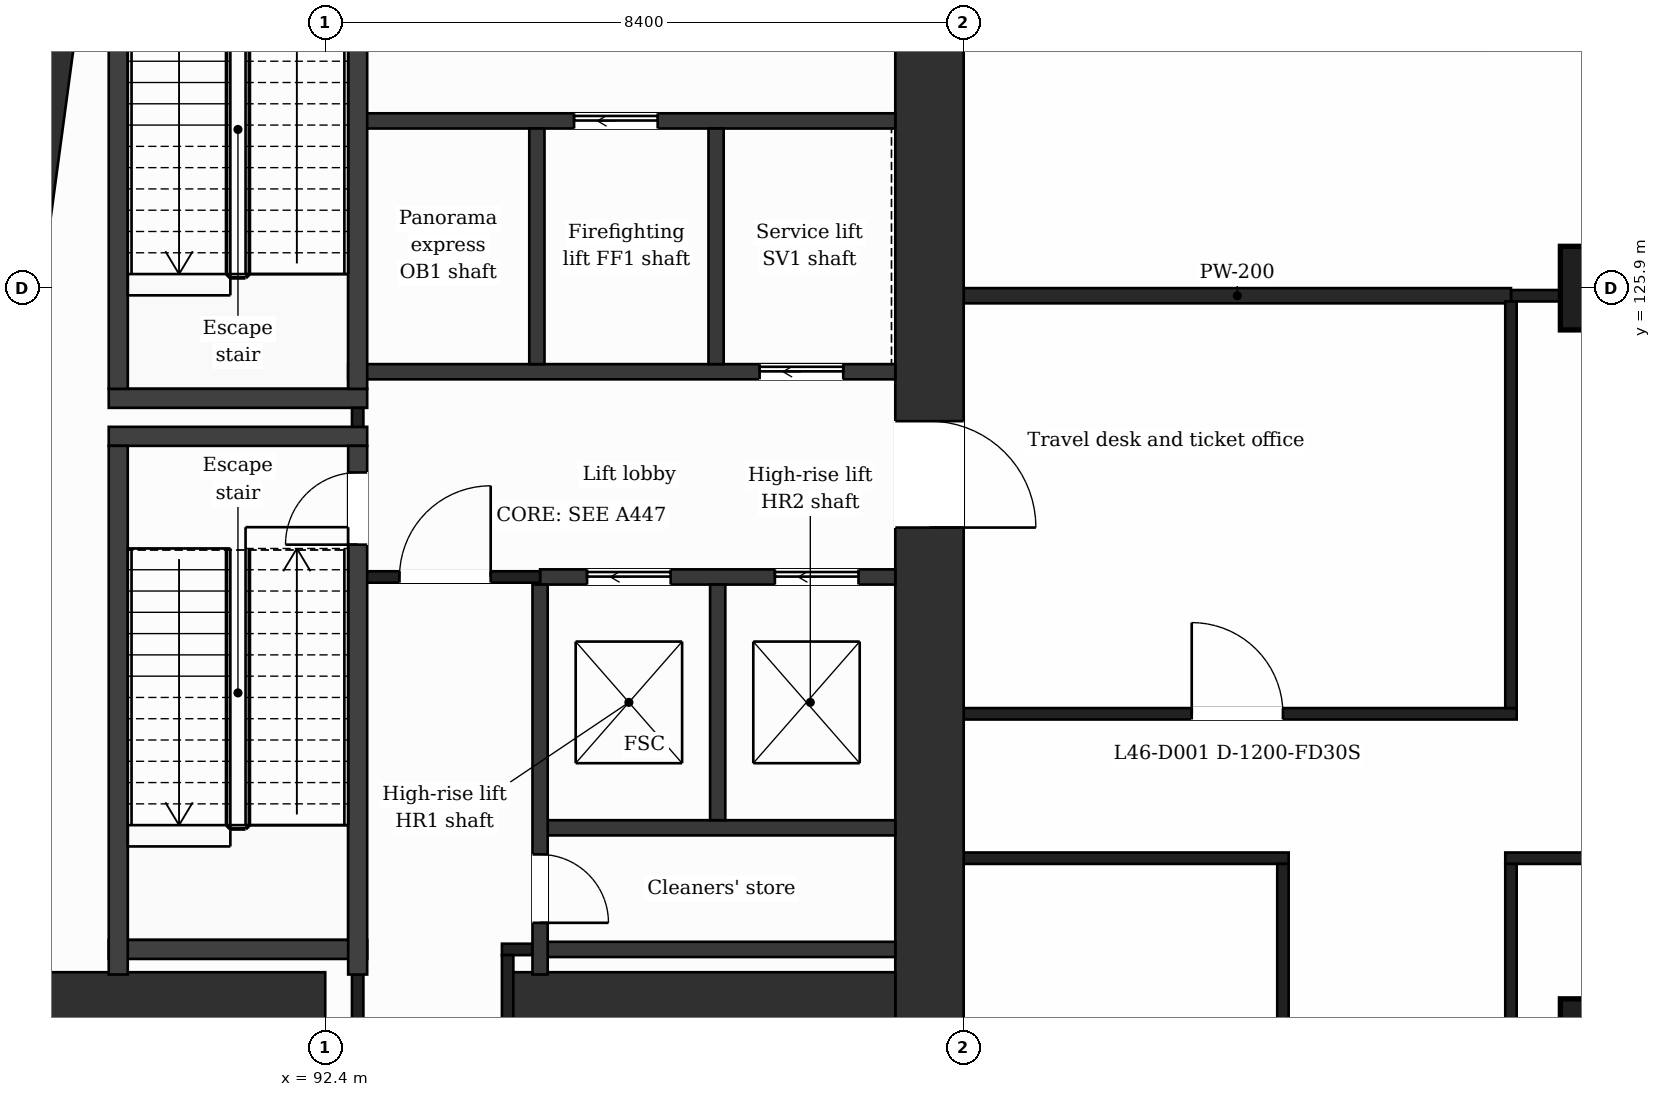
"""IFC4 building model, lengths in metres.
Left out: names, types, materials, properties, quantities, classifications, styles, units other than length and angle.
Written with IfcOpenShell. Run it as: python <this file> out.ifc"""

import sys

from ifc_helpers import new_model, si_unit, direction, frame, frame_2d, origin, origin_2d, place, context, subcontext, project, spatial, rectangle, extrude, element, fill, save


model = new_model("IFC4")
c1 = context("Model", 3, precision=1e-05, world=origin(), true_north=direction((0.0, 1.0)))
c2 = subcontext(c1, "Body", "Model", "MODEL_VIEW")
j1 = project(units=[si_unit("LENGTHUNIT", "METRE"), si_unit("PLANEANGLEUNIT", "RADIAN")], contexts=[c1])
p1 = place(None, origin())
s1 = spatial("IfcSite", under=j1, at=p1, CompositionType="ELEMENT")
p2 = place(p1, origin())
s2 = spatial("IfcBuilding", under=s1, at=p2, CompositionType="ELEMENT")
p3 = place(p2, frame((0.0, 0.0, 192.2)))
s3 = spatial("IfcBuildingStorey", under=s2, at=p3, CompositionType="ELEMENT", Elevation=192.2)
p4 = place(p3, frame((100.35, 131.95, 0.0), z_axis=(0.0, 0.0, 1.0), x_axis=(0.0, -1.0, 0.0)))
e1 = element("IfcWall", 1, at=p4, inside=s3, PredefinedType="SHEAR", context=c2, shape_type="SweptSolid", body=[
    extrude(rectangle(XDim=21.1, YDim=0.9, at=frame_2d((10.55, 0.0))), origin(), (0.0, 0.0, 1.0), 5.0),
])
p5 = place(p4, frame((7.8, 0.0, 0.0)))
e2 = element("IfcOpeningElement", 2, at=p5, cuts=e1, PredefinedType="OPENING", context=c2, shape_type="SweptSolid", body=[
    extrude(rectangle(XDim=1.4, YDim=2.1, at=frame_2d((0.7, 1.05))), frame((0.0, 0.46, 0.0), z_axis=(0.0, -1.0, 0.0), x_axis=(1.0, 0.0, 0.0)), (0.0, 0.0, 1.0), 0.92),
])
p6 = place(p3, frame((86.184, 110.85, 0.0), z_axis=(0.0, 0.0, 1.0), x_axis=(0.133410495943, 0.991060865725, 0.0)))
e3 = element("IfcWall", 3, at=p6, inside=s3, PredefinedType="SHEAR", context=c2, shape_type="SweptSolid", body=[
    extrude(rectangle(XDim=21.29, YDim=0.9, at=frame_2d((10.645, 0.0))), origin(), (0.0, 0.0, 1.0), 5.0),
])
p7 = place(p3, frame((87.323, 116.45, 0.0), z_axis=(0.0, 0.0, 1.0), x_axis=(1.0, 0.0, 0.0)))
e4 = element("IfcWall", 4, at=p7, inside=s3, PredefinedType="SHEAR", context=c2, shape_type="SweptSolid", body=[
    extrude(rectangle(XDim=5.077, YDim=0.9, at=frame_2d((2.539, 0.0))), origin(), (0.0, 0.0, 1.0), 5.0),
])
p8 = place(p3, frame((94.8, 116.45, 0.0), z_axis=(0.0, 0.0, 1.0), x_axis=(1.0, 0.0, 0.0)))
e5 = element("IfcWall", 5, at=p8, inside=s3, PredefinedType="SHEAR", context=c2, shape_type="SweptSolid", body=[
    extrude(rectangle(XDim=5.1, YDim=0.9, at=frame_2d((2.55, 0.0))), origin(), (0.0, 0.0, 1.0), 5.0),
])
for number, where, z_axis, x_axis in (
    (6, (109.2, 116.0, 0.0), (0.0, 0.0, 1.0), (1.0, 0.0, 0.0)),
    (7, (109.2, 125.9, 0.0), (0.0, 0.0, 1.0), (1.0, 0.0, 0.0)),
):
    element("IfcColumn", number, at=place(p3, frame(where, z_axis=z_axis, x_axis=x_axis)), inside=s3, PredefinedType="COLUMN", context=c2, shape_type="SweptSolid", body=[
        extrude(rectangle(XDim=1.1, YDim=1.1, at=origin_2d()), origin(), (0.0, 0.0, 1.0), 5.0),
    ])
p9 = place(p3, frame((95.227, 117.2, 0.0), z_axis=(0.0, 0.0, 1.0), x_axis=(1.0, 0.0, 0.0)))
e8 = element("IfcWall", 8, at=p9, inside=s3, PredefinedType="PARTITIONING", context=c2, shape_type="SweptSolid", body=[
    extrude(rectangle(XDim=4.673, YDim=0.2, at=frame_2d((2.336, 0.0))), origin(), (0.0, 0.0, 1.0), 4.5),
])
p10 = place(p3, frame((94.725, 117.2, 0.0), z_axis=(0.0, 0.0, 1.0), x_axis=(1.0, 0.0, 0.0)))
e9 = element("IfcWall", 9, at=p10, inside=s3, PredefinedType="PARTITIONING", context=c2, shape_type="SweptSolid", body=[
    extrude(rectangle(XDim=0.502, YDim=0.15, at=frame_2d((0.251, 0.0))), origin(), (0.0, 0.0, 1.0), 4.5),
])
p11 = place(p3, frame((89.552, 117.2, 0.0), z_axis=(0.0, 0.0, 1.0), x_axis=(1.0, 0.0, 0.0)))
e10 = element("IfcWall", 10, at=p11, inside=s3, PredefinedType="PARTITIONING", context=c2, shape_type="SweptSolid", body=[
    extrude(rectangle(XDim=3.4, YDim=0.25, at=frame_2d((1.7, 0.0))), origin(), (0.0, 0.0, 1.0), 4.5),
])
p12 = place(p3, frame((100.8, 118.4, 0.0), z_axis=(0.0, 0.0, 1.0), x_axis=(1.0, 0.0, 0.0)))
e11 = element("IfcWall", 11, at=p12, inside=s3, PredefinedType="PARTITIONING", context=c2, shape_type="SweptSolid", body=[
    extrude(rectangle(XDim=4.275, YDim=0.15, at=frame_2d((2.137, 0.0))), origin(), (0.0, 0.0, 1.0), 4.5),
])
p13 = place(p3, frame((107.925, 118.4, 0.0), z_axis=(0.0, 0.0, 1.0), x_axis=(1.0, 0.0, 0.0)))
e12 = element("IfcWall", 12, at=p13, inside=s3, PredefinedType="PARTITIONING", context=c2, shape_type="SweptSolid", body=[
    extrude(rectangle(XDim=18.075, YDim=0.15, at=frame_2d((9.038, 0.0))), origin(), (0.0, 0.0, 1.0), 4.5),
])
p14 = place(p13, frame((8.475, 0.0, 0.0)))
e13 = element("IfcOpeningElement", 13, at=p14, cuts=e12, PredefinedType="OPENING", context=c2, shape_type="SweptSolid", body=[
    extrude(rectangle(XDim=1.2, YDim=2.1, at=frame_2d((0.6, 1.05))), frame((0.0, 0.085, 0.0), z_axis=(0.0, -1.0, 0.0), x_axis=(1.0, 0.0, 0.0)), (0.0, 0.0, 1.0), 0.17),
])
p15 = place(p3, frame((95.227, 118.8, 0.0), z_axis=(0.0, 0.0, 1.0), x_axis=(1.0, 0.0, 0.0)))
e14 = element("IfcWall", 14, at=p15, inside=s3, PredefinedType="PARTITIONING", context=c2, shape_type="SweptSolid", body=[
    extrude(rectangle(XDim=4.673, YDim=0.2, at=frame_2d((2.336, 0.0))), origin(), (0.0, 0.0, 1.0), 4.5),
])
p16 = place(p3, frame((100.8, 120.3, 0.0), z_axis=(0.0, 0.0, 1.0), x_axis=(1.0, 0.0, 0.0)))
e15 = element("IfcWall", 15, at=p16, inside=s3, PredefinedType="PARTITIONING", context=c2, shape_type="SweptSolid", body=[
    extrude(rectangle(XDim=7.275, YDim=0.15, at=frame_2d((3.637, 0.0))), origin(), (0.0, 0.0, 1.0), 4.5),
])
p17 = place(p16, frame((3.0, 0.0, 0.0)))
e16 = element("IfcOpeningElement", 16, at=p17, cuts=e15, PredefinedType="OPENING", context=c2, shape_type="SweptSolid", body=[
    extrude(rectangle(XDim=1.2, YDim=2.1, at=frame_2d((0.6, 1.05))), frame((0.0, 0.085, 0.0), z_axis=(0.0, -1.0, 0.0), x_axis=(1.0, 0.0, 0.0)), (0.0, 0.0, 1.0), 0.17),
])
p18 = place(p3, frame((95.227, 122.1, 0.0), z_axis=(0.0, 0.0, 1.0), x_axis=(1.0, 0.0, 0.0)))
e17 = element("IfcWall", 17, at=p18, inside=s3, PredefinedType="PARTITIONING", context=c2, shape_type="SweptSolid", body=[
    extrude(rectangle(XDim=4.673, YDim=0.2, at=frame_2d((2.336, 0.0))), origin(), (0.0, 0.0, 1.0), 4.5),
])
p19 = place(p18, frame((0.618, 0.0, 0.0)))
e18 = element("IfcOpeningElement", 18, at=p19, cuts=e17, PredefinedType="OPENING", context=c2, shape_type="SweptSolid", body=[
    extrude(rectangle(XDim=1.1, YDim=2.1, at=frame_2d((0.55, 1.05))), frame((0.0, 0.11, 0.0), z_axis=(0.0, -1.0, 0.0), x_axis=(1.0, 0.0, 0.0)), (0.0, 0.0, 1.0), 0.22),
])
p20 = place(p18, frame((3.089, 0.0, 0.0)))
e19 = element("IfcOpeningElement", 19, at=p20, cuts=e17, PredefinedType="OPENING", context=c2, shape_type="SweptSolid", body=[
    extrude(rectangle(XDim=1.1, YDim=2.1, at=frame_2d((0.55, 1.05))), frame((0.0, 0.11, 0.0), z_axis=(0.0, -1.0, 0.0), x_axis=(1.0, 0.0, 0.0)), (0.0, 0.0, 1.0), 0.22),
])
p21 = place(p3, frame((92.827, 122.1, 0.0), z_axis=(0.0, 0.0, 1.0), x_axis=(1.0, 0.0, 0.0)))
e20 = element("IfcWall", 20, at=p21, inside=s3, PredefinedType="PARTITIONING", context=c2, shape_type="SweptSolid", body=[
    extrude(rectangle(XDim=2.4, YDim=0.15, at=frame_2d((1.2, 0.0))), origin(), (0.0, 0.0, 1.0), 4.5),
])
p22 = place(p21, frame((0.55, 0.0, 0.0)))
e21 = element("IfcOpeningElement", 21, at=p22, cuts=e20, PredefinedType="OPENING", context=c2, shape_type="SweptSolid", body=[
    extrude(rectangle(XDim=1.2, YDim=2.1, at=frame_2d((0.6, 1.05))), frame((0.0, 0.085, 0.0), z_axis=(0.0, -1.0, 0.0), x_axis=(1.0, 0.0, 0.0)), (0.0, 0.0, 1.0), 0.17),
])
for number, where, z_axis, x_axis in (
    (22, (89.552, 123.95, 0.0), (0.0, 0.0, 1.0), (1.0, 0.0, 0.0)),
    (23, (89.552, 124.45, 0.0), (0.0, 0.0, 1.0), (1.0, 0.0, 0.0)),
):
    element("IfcWall", number, at=place(p3, frame(where, z_axis=z_axis, x_axis=x_axis)), inside=s3, PredefinedType="PARTITIONING", context=c2, shape_type="SweptSolid", body=[
        extrude(rectangle(XDim=3.4, YDim=0.25, at=frame_2d((1.7, 0.0))), origin(), (0.0, 0.0, 1.0), 4.5),
    ])
p23 = place(p3, frame((92.702, 124.8, 0.0), z_axis=(0.0, 0.0, 1.0), x_axis=(1.0, 0.0, 0.0)))
e24 = element("IfcWall", 24, at=p23, inside=s3, PredefinedType="PARTITIONING", context=c2, shape_type="SweptSolid", body=[
    extrude(rectangle(XDim=7.198, YDim=0.2, at=frame_2d((3.599, 0.0))), origin(), (0.0, 0.0, 1.0), 4.5),
])
p24 = place(p23, frame((5.413, 0.0, 0.0)))
e25 = element("IfcOpeningElement", 25, at=p24, cuts=e24, PredefinedType="OPENING", context=c2, shape_type="SweptSolid", body=[
    extrude(rectangle(XDim=1.1, YDim=2.1, at=frame_2d((0.55, 1.05))), frame((0.0, 0.11, 0.0), z_axis=(0.0, -1.0, 0.0), x_axis=(1.0, 0.0, 0.0)), (0.0, 0.0, 1.0), 0.22),
])
p25 = place(p3, frame((108.0, 125.8, 0.0), z_axis=(0.0, 0.0, 1.0), x_axis=(1.0, 0.0, 0.0)))
e26 = element("IfcWall", 26, at=p25, inside=s3, PredefinedType="PARTITIONING", context=c2, shape_type="SweptSolid", body=[
    extrude(rectangle(XDim=9.075, YDim=0.15, at=frame_2d((4.538, 0.0))), origin(), (0.0, 0.0, 1.0), 4.5),
])
p26 = place(p25, frame((4.0, 0.0, 0.0)))
e27 = element("IfcOpeningElement", 27, at=p26, cuts=e26, PredefinedType="OPENING", context=c2, shape_type="SweptSolid", body=[
    extrude(rectangle(XDim=1.0, YDim=2.1, at=frame_2d((0.5, 1.05))), frame((0.0, 0.085, 0.0), z_axis=(0.0, -1.0, 0.0), x_axis=(1.0, 0.0, 0.0)), (0.0, 0.0, 1.0), 0.17),
])
p27 = place(p3, frame((100.8, 125.8, 0.0), z_axis=(0.0, 0.0, 1.0), x_axis=(1.0, 0.0, 0.0)))
e28 = element("IfcWall", 28, at=p27, inside=s3, PredefinedType="PARTITIONING", context=c2, shape_type="SweptSolid", body=[
    extrude(rectangle(XDim=7.2, YDim=0.2, at=frame_2d((3.6, 0.0))), origin(), (0.0, 0.0, 1.0), 4.5),
])
p28 = place(p3, frame((92.827, 128.1, 0.0), z_axis=(0.0, 0.0, 1.0), x_axis=(1.0, 0.0, 0.0)))
e29 = element("IfcWall", 29, at=p28, inside=s3, PredefinedType="PARTITIONING", context=c2, shape_type="SweptSolid", body=[
    extrude(rectangle(XDim=7.073, YDim=0.2, at=frame_2d((3.537, 0.0))), origin(), (0.0, 0.0, 1.0), 4.5),
])
p29 = place(p28, frame((2.847, 0.0, 0.0)))
e30 = element("IfcOpeningElement", 30, at=p29, cuts=e29, PredefinedType="OPENING", context=c2, shape_type="SweptSolid", body=[
    extrude(rectangle(XDim=1.1, YDim=2.1, at=frame_2d((0.55, 1.05))), frame((0.0, 0.11, 0.0), z_axis=(0.0, -1.0, 0.0), x_axis=(1.0, 0.0, 0.0)), (0.0, 0.0, 1.0), 0.22),
])
p30 = place(p3, frame((89.677, 116.87, 0.0), z_axis=(0.0, 0.0, 1.0), x_axis=(0.0, 1.0, 0.0)))
e31 = element("IfcWall", 31, at=p30, inside=s3, PredefinedType="PARTITIONING", context=c2, shape_type="SweptSolid", body=[
    extrude(rectangle(XDim=6.955, YDim=0.25, at=frame_2d((3.478, 0.0))), origin(), (0.0, 0.0, 1.0), 4.5),
])
p31 = place(p3, frame((89.677, 124.575, 0.0), z_axis=(0.0, 0.0, 1.0), x_axis=(0.0, 1.0, 0.0)))
e32 = element("IfcWall", 32, at=p31, inside=s3, PredefinedType="PARTITIONING", context=c2, shape_type="SweptSolid", body=[
    extrude(rectangle(XDim=6.955, YDim=0.25, at=frame_2d((3.478, 0.0))), origin(), (0.0, 0.0, 1.0), 4.5),
])
p32 = place(p3, frame((92.827, 116.0, 0.0), z_axis=(0.0, 0.0, 1.0), x_axis=(0.0, 1.0, 0.0)))
e33 = element("IfcWall", 33, at=p32, inside=s3, PredefinedType="PARTITIONING", context=c2, shape_type="SweptSolid", body=[
    extrude(rectangle(XDim=0.87, YDim=0.15, at=frame_2d((0.435, 0.0))), origin(), (0.0, 0.0, 1.0), 4.5),
])
p33 = place(p3, frame((92.827, 124.075, 0.0), z_axis=(0.0, 0.0, 1.0), x_axis=(0.0, 1.0, 0.0)))
e34 = element("IfcWall", 34, at=p33, inside=s3, PredefinedType="PARTITIONING", context=c2, shape_type="SweptSolid", body=[
    extrude(rectangle(XDim=0.25, YDim=0.15, at=frame_2d((0.125, 0.0))), origin(), (0.0, 0.0, 1.0), 4.5),
])
p34 = place(p3, frame((92.827, 116.87, 0.0), z_axis=(0.0, 0.0, 1.0), x_axis=(0.0, 1.0, 0.0)))
e35 = element("IfcWall", 35, at=p34, inside=s3, PredefinedType="PARTITIONING", context=c2, shape_type="SweptSolid", body=[
    extrude(rectangle(XDim=6.955, YDim=0.25, at=frame_2d((3.478, 0.0))), origin(), (0.0, 0.0, 1.0), 4.5),
])
p35 = place(p34, frame((5.655, 0.0, 0.0)))
e36 = element("IfcOpeningElement", 36, at=p35, cuts=e35, PredefinedType="OPENING", context=c2, shape_type="SweptSolid", body=[
    extrude(rectangle(XDim=0.95, YDim=2.1, at=frame_2d((0.475, 1.05))), frame((0.0, 0.135, 0.0), z_axis=(0.0, -1.0, 0.0), x_axis=(1.0, 0.0, 0.0)), (0.0, 0.0, 1.0), 0.27),
])
p36 = place(p3, frame((92.827, 124.575, 0.0), z_axis=(0.0, 0.0, 1.0), x_axis=(0.0, 1.0, 0.0)))
e37 = element("IfcWall", 37, at=p36, inside=s3, PredefinedType="PARTITIONING", context=c2, shape_type="SweptSolid", body=[
    extrude(rectangle(XDim=6.955, YDim=0.25, at=frame_2d((3.478, 0.0))), origin(), (0.0, 0.0, 1.0), 4.5),
])
p37 = place(p36, frame((5.325, 0.0, 0.0)))
e38 = element("IfcOpeningElement", 38, at=p37, cuts=e37, PredefinedType="OPENING", context=c2, shape_type="SweptSolid", body=[
    extrude(rectangle(XDim=1.0, YDim=2.1, at=frame_2d((0.5, 1.05))), frame((0.0, 0.135, 0.0), z_axis=(0.0, -1.0, 0.0), x_axis=(1.0, 0.0, 0.0)), (0.0, 0.0, 1.0), 0.27),
])
p38 = place(p3, frame((94.8, 116.0, 0.0), z_axis=(0.0, 0.0, 1.0), x_axis=(0.0, 1.0, 0.0)))
e39 = element("IfcWall", 39, at=p38, inside=s3, PredefinedType="PARTITIONING", context=c2, shape_type="SweptSolid", body=[
    extrude(rectangle(XDim=1.125, YDim=0.15, at=frame_2d((0.562, 0.0))), origin(), (0.0, 0.0, 1.0), 4.5),
])
p39 = place(p3, frame((95.185, 124.9, 0.0), z_axis=(0.0, 0.0, 1.0), x_axis=(0.0, 1.0, 0.0)))
e40 = element("IfcWall", 40, at=p39, inside=s3, PredefinedType="PARTITIONING", context=c2, shape_type="SweptSolid", body=[
    extrude(rectangle(XDim=3.1, YDim=0.2, at=frame_2d((1.55, 0.0))), origin(), (0.0, 0.0, 1.0), 4.5),
])
p40 = place(p3, frame((95.227, 116.87, 0.0), z_axis=(0.0, 0.0, 1.0), x_axis=(0.0, 1.0, 0.0)))
e41 = element("IfcWall", 41, at=p40, inside=s3, PredefinedType="PARTITIONING", context=c2, shape_type="SweptSolid", body=[
    extrude(rectangle(XDim=5.13, YDim=0.2, at=frame_2d((2.565, 0.0))), origin(), (0.0, 0.0, 1.0), 4.5),
])
p41 = place(p40, frame((0.68, 0.0, 0.0)))
e42 = element("IfcOpeningElement", 42, at=p41, cuts=e41, PredefinedType="OPENING", context=c2, shape_type="SweptSolid", body=[
    extrude(rectangle(XDim=0.9, YDim=2.1, at=frame_2d((0.45, 1.05))), frame((0.0, 0.11, 0.0), z_axis=(0.0, -1.0, 0.0), x_axis=(1.0, 0.0, 0.0)), (0.0, 0.0, 1.0), 0.22),
])
for number, where, z_axis, x_axis in (
    (43, (97.542, 124.9, 0.0), (0.0, 0.0, 1.0), (0.0, 1.0, 0.0)),
    (44, (97.563, 118.9, 0.0), (0.0, 0.0, 1.0), (0.0, 1.0, 0.0)),
):
    element("IfcWall", number, at=place(p3, frame(where, z_axis=z_axis, x_axis=x_axis)), inside=s3, PredefinedType="PARTITIONING", context=c2, shape_type="SweptSolid", body=[
        extrude(rectangle(XDim=3.1, YDim=0.2, at=frame_2d((1.55, 0.0))), origin(), (0.0, 0.0, 1.0), 4.5),
    ])
p42 = place(p3, frame((105.0, 110.475, 0.0), z_axis=(0.0, 0.0, 1.0), x_axis=(0.0, 1.0, 0.0)))
e45 = element("IfcWall", 45, at=p42, inside=s3, PredefinedType="PARTITIONING", context=c2, shape_type="SweptSolid", body=[
    extrude(rectangle(XDim=7.85, YDim=0.15, at=frame_2d((3.925, 0.0))), origin(), (0.0, 0.0, 1.0), 4.5),
])
p43 = place(p42, frame((3.325, 0.0, 0.0)))
e46 = element("IfcOpeningElement", 46, at=p43, cuts=e45, PredefinedType="OPENING", context=c2, shape_type="SweptSolid", body=[
    extrude(rectangle(XDim=1.2, YDim=2.1, at=frame_2d((0.6, 1.05))), frame((0.0, 0.085, 0.0), z_axis=(0.0, -1.0, 0.0), x_axis=(1.0, 0.0, 0.0)), (0.0, 0.0, 1.0), 0.17),
])
p44 = place(p3, frame((108.0, 110.475, 0.0), z_axis=(0.0, 0.0, 1.0), x_axis=(0.0, 1.0, 0.0)))
e47 = element("IfcWall", 47, at=p44, inside=s3, PredefinedType="PARTITIONING", context=c2, shape_type="SweptSolid", body=[
    extrude(rectangle(XDim=7.85, YDim=0.15, at=frame_2d((3.925, 0.0))), origin(), (0.0, 0.0, 1.0), 4.5),
])
p45 = place(p3, frame((108.0, 120.375, 0.0), z_axis=(0.0, 0.0, 1.0), x_axis=(0.0, 1.0, 0.0)))
e48 = element("IfcWall", 48, at=p45, inside=s3, PredefinedType="PARTITIONING", context=c2, shape_type="SweptSolid", body=[
    extrude(rectangle(XDim=5.35, YDim=0.15, at=frame_2d((2.675, 0.0))), origin(), (0.0, 0.0, 1.0), 4.5),
])
p46 = place(p17, origin())
e49 = element("IfcDoor", 49, at=p46, inside=s3, OperationType="SINGLE_SWING_LEFT", PredefinedType="DOOR", context=c2, shape_type="SweptSolid", body=[
    extrude(rectangle(XDim=1.2, YDim=2.1, at=frame_2d((0.6, 1.05))), frame((0.0, 0.025, 0.0), z_axis=(0.0, -1.0, 0.0), x_axis=(1.0, 0.0, 0.0)), (0.0, 0.0, 1.0), 0.05),
])
fill(e16, e49)
p47 = place(p22, origin())
e50 = element("IfcDoor", 50, at=p47, inside=s3, OperationType="SINGLE_SWING_RIGHT", PredefinedType="DOOR", context=c2, shape_type="SweptSolid", body=[
    extrude(rectangle(XDim=1.2, YDim=2.1, at=frame_2d((0.6, 1.05))), frame((0.0, 0.025, 0.0), z_axis=(0.0, -1.0, 0.0), x_axis=(1.0, 0.0, 0.0)), (0.0, 0.0, 1.0), 0.05),
])
fill(e21, e50)
p48 = place(p19, origin())
e51 = element("IfcDoor", 51, at=p48, inside=s3, OperationType="SLIDING_TO_LEFT", PredefinedType="DOOR", context=c2, shape_type="SweptSolid", body=[
    extrude(rectangle(XDim=1.1, YDim=2.1, at=frame_2d((0.55, 1.05))), frame((0.0, 0.025, 0.0), z_axis=(0.0, -1.0, 0.0), x_axis=(1.0, 0.0, 0.0)), (0.0, 0.0, 1.0), 0.05),
])
fill(e18, e51)
p49 = place(p20, origin())
e52 = element("IfcDoor", 52, at=p49, inside=s3, OperationType="SLIDING_TO_LEFT", PredefinedType="DOOR", context=c2, shape_type="SweptSolid", body=[
    extrude(rectangle(XDim=1.1, YDim=2.1, at=frame_2d((0.55, 1.05))), frame((0.0, 0.025, 0.0), z_axis=(0.0, -1.0, 0.0), x_axis=(1.0, 0.0, 0.0)), (0.0, 0.0, 1.0), 0.05),
])
fill(e19, e52)
p50 = place(p29, origin())
e53 = element("IfcDoor", 53, at=p50, inside=s3, OperationType="SLIDING_TO_LEFT", PredefinedType="DOOR", context=c2, shape_type="SweptSolid", body=[
    extrude(rectangle(XDim=1.1, YDim=2.1, at=frame_2d((0.55, 1.05))), frame((0.0, 0.025, 0.0), z_axis=(0.0, -1.0, 0.0), x_axis=(1.0, 0.0, 0.0)), (0.0, 0.0, 1.0), 0.05),
])
fill(e30, e53)
p51 = place(p24, origin())
e54 = element("IfcDoor", 54, at=p51, inside=s3, OperationType="SLIDING_TO_LEFT", PredefinedType="DOOR", context=c2, shape_type="SweptSolid", body=[
    extrude(rectangle(XDim=1.1, YDim=2.1, at=frame_2d((0.55, 1.05))), frame((0.0, 0.025, 0.0), z_axis=(0.0, -1.0, 0.0), x_axis=(1.0, 0.0, 0.0)), (0.0, 0.0, 1.0), 0.05),
])
fill(e25, e54)
p52 = place(p35, origin())
e55 = element("IfcDoor", 55, at=p52, inside=s3, OperationType="SINGLE_SWING_LEFT", PredefinedType="DOOR", context=c2, shape_type="SweptSolid", body=[
    extrude(rectangle(XDim=0.95, YDim=2.1, at=frame_2d((0.475, 1.05))), frame((0.0, 0.025, 0.0), z_axis=(0.0, -1.0, 0.0), x_axis=(1.0, 0.0, 0.0)), (0.0, 0.0, 1.0), 0.05),
])
fill(e36, e55)
p53 = place(p41, origin())
e56 = element("IfcDoor", 56, at=p53, inside=s3, OperationType="SINGLE_SWING_LEFT", PredefinedType="DOOR", context=c2, shape_type="SweptSolid", body=[
    extrude(rectangle(XDim=0.9, YDim=2.1, at=frame_2d((0.45, 1.05))), frame((0.0, 0.025, 0.0), z_axis=(0.0, -1.0, 0.0), x_axis=(1.0, 0.0, 0.0)), (0.0, 0.0, 1.0), 0.05),
])
fill(e42, e56)
p54 = place(p5, origin())
e57 = element("IfcDoor", 57, at=p54, inside=s3, OperationType="SINGLE_SWING_RIGHT", PredefinedType="DOOR", context=c2, shape_type="SweptSolid", body=[
    extrude(rectangle(XDim=1.4, YDim=2.1, at=frame_2d((0.7, 1.05))), frame((0.0, 0.025, 0.0), z_axis=(0.0, -1.0, 0.0), x_axis=(1.0, 0.0, 0.0)), (0.0, 0.0, 1.0), 0.05),
])
fill(e2, e57)
save(model, sys.argv[1])
